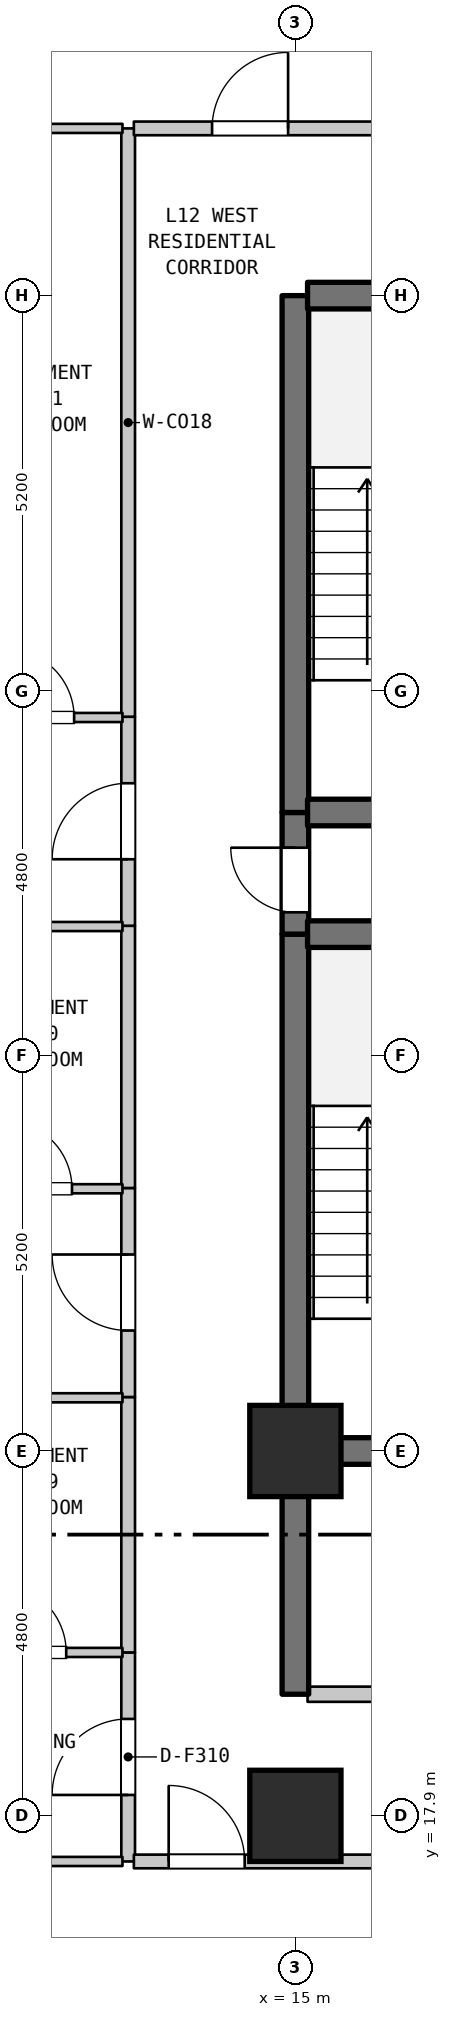
"""IFC4 building model, lengths in metres.
Left out: names, types, materials, properties, quantities, classifications, styles, units other than length and angle.
Written with IfcOpenShell. Run it as: python <this file> out.ifc"""

import sys

from ifc_helpers import new_model, si_unit, direction, frame, frame_2d, origin, origin_2d, place, context, subcontext, project, spatial, rectangle, extrude, element, fill, save


model = new_model("IFC4")
c1 = context("Model", 3, precision=1e-05, world=origin(), true_north=direction((0.0, 1.0)))
c2 = subcontext(c1, "Body", "Model", "MODEL_VIEW")
j1 = project(units=[si_unit("LENGTHUNIT", "METRE"), si_unit("PLANEANGLEUNIT", "RADIAN")], contexts=[c1])
p1 = place(None, origin())
s1 = spatial("IfcSite", under=j1, at=p1, CompositionType="ELEMENT")
p2 = place(p1, origin())
s2 = spatial("IfcBuilding", under=s1, at=p2, CompositionType="ELEMENT")
p3 = place(p2, frame((0.0, 0.0, 53.6)))
s3 = spatial("IfcBuildingStorey", under=s2, at=p3, CompositionType="ELEMENT", Elevation=53.6)
for number, where, z_axis, x_axis in (
    (1, (15.0, 17.9, 0.0), (0.0, 0.0, 1.0), (1.0, 0.0, 0.0)),
    (2, (15.0, 22.7, 0.0), (0.0, 0.0, 1.0), (1.0, 0.0, 0.0)),
):
    element("IfcColumn", number, at=place(p3, frame(where, z_axis=z_axis, x_axis=x_axis)), inside=s3, PredefinedType="COLUMN", context=c2, shape_type="SweptSolid", body=[
        extrude(rectangle(XDim=1.2, YDim=1.2, at=origin_2d()), origin(), (0.0, 0.0, 1.0), 3.7),
    ])
p4 = place(p3, frame((12.8, 17.3, 0.0), z_axis=(0.0, 0.0, 1.0), x_axis=(0.0, 1.0, 0.0)))
e3 = element("IfcWall", 3, at=p4, inside=s3, PredefinedType="STANDARD", context=c2, shape_type="SweptSolid", body=[
    extrude(rectangle(XDim=2.75, YDim=0.18, at=frame_2d((1.375, 0.0))), origin(), (0.0, 0.0, 1.0), 3.385),
])
p5 = place(p4, frame((0.875, 0.0, 0.0)))
e4 = element("IfcOpeningElement", 4, at=p5, cuts=e3, PredefinedType="OPENING", context=c2, shape_type="SweptSolid", body=[
    extrude(rectangle(XDim=1.0, YDim=2.15, at=frame_2d((0.5, 1.075))), frame((0.0, 0.1, 0.0), z_axis=(0.0, -1.0, 0.0), x_axis=(1.0, 0.0, 0.0)), (0.0, 0.0, 1.0), 0.2),
])
p6 = place(p3, frame((12.8, 20.05, 0.0), z_axis=(0.0, 0.0, 1.0), x_axis=(0.0, 1.0, 0.0)))
e5 = element("IfcWall", 5, at=p6, inside=s3, PredefinedType="STANDARD", context=c2, shape_type="SweptSolid", body=[
    extrude(rectangle(XDim=3.36, YDim=0.18, at=frame_2d((1.68, 0.0))), origin(), (0.0, 0.0, 1.0), 3.385),
])
p7 = place(p3, frame((12.8, 23.41, 0.0), z_axis=(0.0, 0.0, 1.0), x_axis=(0.0, 1.0, 0.0)))
e6 = element("IfcWall", 6, at=p7, inside=s3, PredefinedType="STANDARD", context=c2, shape_type="SweptSolid", body=[
    extrude(rectangle(XDim=2.75, YDim=0.18, at=frame_2d((1.375, 0.0))), origin(), (0.0, 0.0, 1.0), 3.385),
])
p8 = place(p7, frame((0.875, 0.0, 0.0)))
e7 = element("IfcOpeningElement", 7, at=p8, cuts=e6, PredefinedType="OPENING", context=c2, shape_type="SweptSolid", body=[
    extrude(rectangle(XDim=1.0, YDim=2.15, at=frame_2d((0.5, 1.075))), frame((0.0, 0.1, 0.0), z_axis=(0.0, -1.0, 0.0), x_axis=(1.0, 0.0, 0.0)), (0.0, 0.0, 1.0), 0.2),
])
p9 = place(p3, frame((12.8, 26.16, 0.0), z_axis=(0.0, 0.0, 1.0), x_axis=(0.0, 1.0, 0.0)))
e8 = element("IfcWall", 8, at=p9, inside=s3, PredefinedType="STANDARD", context=c2, shape_type="SweptSolid", body=[
    extrude(rectangle(XDim=3.45, YDim=0.18, at=frame_2d((1.725, 0.0))), origin(), (0.0, 0.0, 1.0), 3.385),
])
p10 = place(p3, frame((12.8, 29.61, 0.0), z_axis=(0.0, 0.0, 1.0), x_axis=(0.0, 1.0, 0.0)))
e9 = element("IfcWall", 9, at=p10, inside=s3, PredefinedType="STANDARD", context=c2, shape_type="SweptSolid", body=[
    extrude(rectangle(XDim=2.75, YDim=0.18, at=frame_2d((1.375, 0.0))), origin(), (0.0, 0.0, 1.0), 3.385),
])
p11 = place(p10, frame((0.875, 0.0, 0.0)))
e10 = element("IfcOpeningElement", 10, at=p11, cuts=e9, PredefinedType="OPENING", context=c2, shape_type="SweptSolid", body=[
    extrude(rectangle(XDim=1.0, YDim=2.15, at=frame_2d((0.5, 1.075))), frame((0.0, 0.1, 0.0), z_axis=(0.0, -1.0, 0.0), x_axis=(1.0, 0.0, 0.0)), (0.0, 0.0, 1.0), 0.2),
])
p12 = place(p3, frame((12.8, 32.36, 0.0), z_axis=(0.0, 0.0, 1.0), x_axis=(0.0, 1.0, 0.0)))
e11 = element("IfcWall", 11, at=p12, inside=s3, PredefinedType="STANDARD", context=c2, shape_type="SweptSolid", body=[
    extrude(rectangle(XDim=7.74, YDim=0.18, at=frame_2d((3.87, 0.0))), origin(), (0.0, 0.0, 1.0), 3.385),
])
p13 = place(p3, frame((15.0, 19.5, 0.0), z_axis=(0.0, 0.0, 1.0), x_axis=(0.0, 1.0, 0.0)))
e12 = element("IfcWall", 12, at=p13, inside=s3, PredefinedType="SHEAR", context=c2, shape_type="SweptSolid", body=[
    extrude(rectangle(XDim=3.2, YDim=0.35, at=frame_2d((1.6, 0.0))), origin(), (0.0, 0.0, 1.0), 3.385),
])
p14 = place(p3, frame((15.0, 22.7, 0.0), z_axis=(0.0, 0.0, 1.0), x_axis=(0.0, 1.0, 0.0)))
e13 = element("IfcWall", 13, at=p14, inside=s3, PredefinedType="SHEAR", context=c2, shape_type="SweptSolid", body=[
    extrude(rectangle(XDim=6.8, YDim=0.35, at=frame_2d((3.4, 0.0))), origin(), (0.0, 0.0, 1.0), 3.385),
])
p15 = place(p3, frame((15.0, 29.5, 0.0), z_axis=(0.0, 0.0, 1.0), x_axis=(0.0, 1.0, 0.0)))
e14 = element("IfcWall", 14, at=p15, inside=s3, PredefinedType="SHEAR", context=c2, shape_type="SweptSolid", body=[
    extrude(rectangle(XDim=1.6, YDim=0.35, at=frame_2d((0.8, 0.0))), origin(), (0.0, 0.0, 1.0), 3.385),
])
p16 = place(p15, frame((0.287, 0.0, 0.0)))
e15 = element("IfcOpeningElement", 15, at=p16, cuts=e14, PredefinedType="OPENING", context=c2, shape_type="SweptSolid", body=[
    extrude(rectangle(XDim=0.85, YDim=2.1, at=frame_2d((0.425, 1.05))), frame((0.0, 0.185, 0.0), z_axis=(0.0, -1.0, 0.0), x_axis=(1.0, 0.0, 0.0)), (0.0, 0.0, 1.0), 0.37),
])
p17 = place(p3, frame((15.0, 31.1, 0.0), z_axis=(0.0, 0.0, 1.0), x_axis=(0.0, 1.0, 0.0)))
e16 = element("IfcWall", 16, at=p17, inside=s3, PredefinedType="SHEAR", context=c2, shape_type="SweptSolid", body=[
    extrude(rectangle(XDim=6.8, YDim=0.35, at=frame_2d((3.4, 0.0))), origin(), (0.0, 0.0, 1.0), 3.385),
])
p18 = place(p3, frame((9.085, 17.3, 0.0), z_axis=(0.0, 0.0, 1.0), x_axis=(1.0, 0.0, 0.0)))
e17 = element("IfcWall", 17, at=p18, inside=s3, PredefinedType="PARTITIONING", context=c2, shape_type="SweptSolid", body=[
    extrude(rectangle(XDim=3.64, YDim=0.12, at=frame_2d((1.82, 0.0))), origin(), (0.0, 0.0, 1.0), 3.385),
])
p19 = place(p3, frame((12.875, 17.3, 0.0), z_axis=(0.0, 0.0, 1.0), x_axis=(1.0, 0.0, 0.0)))
e18 = element("IfcWall", 18, at=p19, inside=s3, PredefinedType="STANDARD", context=c2, shape_type="SweptSolid", body=[
    extrude(rectangle(XDim=3.78, YDim=0.18, at=frame_2d((1.89, 0.0))), origin(), (0.0, 0.0, 1.0), 3.385),
])
p20 = place(p19, frame((0.458, 0.0, 0.0)))
e19 = element("IfcOpeningElement", 19, at=p20, cuts=e18, PredefinedType="OPENING", context=c2, shape_type="SweptSolid", body=[
    extrude(rectangle(XDim=1.0, YDim=2.15, at=frame_2d((0.5, 1.075))), frame((0.0, 0.1, 0.0), z_axis=(0.0, -1.0, 0.0), x_axis=(1.0, 0.0, 0.0)), (0.0, 0.0, 1.0), 0.2),
])
p21 = place(p3, frame((15.16, 19.5, 0.0), z_axis=(0.0, 0.0, 1.0), x_axis=(1.0, 0.0, 0.0)))
e20 = element("IfcWall", 20, at=p21, inside=s3, PredefinedType="STANDARD", context=c2, shape_type="SweptSolid", body=[
    extrude(rectangle(XDim=3.68, YDim=0.2, at=frame_2d((1.84, 0.0))), origin(), (0.0, 0.0, 1.0), 3.385),
])
p22 = place(p21, frame((1.39, 0.0, 0.0)))
e21 = element("IfcOpeningElement", 21, at=p22, cuts=e20, PredefinedType="OPENING", context=c2, shape_type="SweptSolid", body=[
    extrude(rectangle(XDim=0.9, YDim=2.15, at=frame_2d((0.45, 1.075))), frame((0.0, 0.11, 0.0), z_axis=(0.0, -1.0, 0.0), x_axis=(1.0, 0.0, 0.0)), (0.0, 0.0, 1.0), 0.22),
])
p23 = place(p3, frame((10.456, 20.05, 0.0), z_axis=(0.0, 0.0, 1.0), x_axis=(1.0, 0.0, 0.0)))
e22 = element("IfcWall", 22, at=p23, inside=s3, PredefinedType="PARTITIONING", context=c2, shape_type="SweptSolid", body=[
    extrude(rectangle(XDim=2.269, YDim=0.12, at=frame_2d((1.135, 0.0))), origin(), (0.0, 0.0, 1.0), 3.385),
])
p24 = place(p23, frame((0.629, 0.0, 0.0)))
e23 = element("IfcOpeningElement", 23, at=p24, cuts=e22, PredefinedType="OPENING", context=c2, shape_type="SweptSolid", body=[
    extrude(rectangle(XDim=0.9, YDim=2.1, at=frame_2d((0.45, 1.05))), frame((0.0, 0.07, 0.0), z_axis=(0.0, -1.0, 0.0), x_axis=(1.0, 0.0, 0.0)), (0.0, 0.0, 1.0), 0.14),
])
p25 = place(p3, frame((15.16, 22.7, 0.0), z_axis=(0.0, 0.0, 1.0), x_axis=(1.0, 0.0, 0.0)))
e24 = element("IfcWall", 24, at=p25, inside=s3, PredefinedType="SHEAR", context=c2, shape_type="SweptSolid", body=[
    extrude(rectangle(XDim=3.68, YDim=0.35, at=frame_2d((1.84, 0.0))), origin(), (0.0, 0.0, 1.0), 3.385),
])
p26 = place(p3, frame((10.456, 23.4, 0.0), z_axis=(0.0, 0.0, 1.0), x_axis=(1.0, 0.0, 0.0)))
e25 = element("IfcWall", 25, at=p26, inside=s3, PredefinedType="PARTITIONING", context=c2, shape_type="SweptSolid", body=[
    extrude(rectangle(XDim=2.269, YDim=0.12, at=frame_2d((1.135, 0.0))), origin(), (0.0, 0.0, 1.0), 3.385),
])
p27 = place(p3, frame((10.466, 26.15, 0.0), z_axis=(0.0, 0.0, 1.0), x_axis=(1.0, 0.0, 0.0)))
e26 = element("IfcWall", 26, at=p27, inside=s3, PredefinedType="PARTITIONING", context=c2, shape_type="SweptSolid", body=[
    extrude(rectangle(XDim=2.259, YDim=0.12, at=frame_2d((1.129, 0.0))), origin(), (0.0, 0.0, 1.0), 3.385),
])
p28 = place(p27, frame((0.695, 0.0, 0.0)))
e27 = element("IfcOpeningElement", 27, at=p28, cuts=e26, PredefinedType="OPENING", context=c2, shape_type="SweptSolid", body=[
    extrude(rectangle(XDim=0.9, YDim=2.1, at=frame_2d((0.45, 1.05))), frame((0.0, 0.07, 0.0), z_axis=(0.0, -1.0, 0.0), x_axis=(1.0, 0.0, 0.0)), (0.0, 0.0, 1.0), 0.14),
])
p29 = place(p3, frame((15.16, 29.5, 0.0), z_axis=(0.0, 0.0, 1.0), x_axis=(1.0, 0.0, 0.0)))
e28 = element("IfcWall", 28, at=p29, inside=s3, PredefinedType="SHEAR", context=c2, shape_type="SweptSolid", body=[
    extrude(rectangle(XDim=3.68, YDim=0.35, at=frame_2d((1.84, 0.0))), origin(), (0.0, 0.0, 1.0), 3.385),
])
p30 = place(p3, frame((10.466, 29.6, 0.0), z_axis=(0.0, 0.0, 1.0), x_axis=(1.0, 0.0, 0.0)))
e29 = element("IfcWall", 29, at=p30, inside=s3, PredefinedType="PARTITIONING", context=c2, shape_type="SweptSolid", body=[
    extrude(rectangle(XDim=2.259, YDim=0.12, at=frame_2d((1.129, 0.0))), origin(), (0.0, 0.0, 1.0), 3.385),
])
p31 = place(p3, frame((15.16, 31.1, 0.0), z_axis=(0.0, 0.0, 1.0), x_axis=(1.0, 0.0, 0.0)))
e30 = element("IfcWall", 30, at=p31, inside=s3, PredefinedType="SHEAR", context=c2, shape_type="SweptSolid", body=[
    extrude(rectangle(XDim=3.68, YDim=0.35, at=frame_2d((1.84, 0.0))), origin(), (0.0, 0.0, 1.0), 3.385),
])
p32 = place(p3, frame((10.523, 32.35, 0.0), z_axis=(0.0, 0.0, 1.0), x_axis=(1.0, 0.0, 0.0)))
e31 = element("IfcWall", 31, at=p32, inside=s3, PredefinedType="PARTITIONING", context=c2, shape_type="SweptSolid", body=[
    extrude(rectangle(XDim=2.202, YDim=0.12, at=frame_2d((1.101, 0.0))), origin(), (0.0, 0.0, 1.0), 3.385),
])
p33 = place(p32, frame((0.666, 0.0, 0.0)))
e32 = element("IfcOpeningElement", 32, at=p33, cuts=e31, PredefinedType="OPENING", context=c2, shape_type="SweptSolid", body=[
    extrude(rectangle(XDim=0.9, YDim=2.1, at=frame_2d((0.45, 1.05))), frame((0.0, 0.07, 0.0), z_axis=(0.0, -1.0, 0.0), x_axis=(1.0, 0.0, 0.0)), (0.0, 0.0, 1.0), 0.14),
])
p34 = place(p3, frame((15.16, 37.9, 0.0), z_axis=(0.0, 0.0, 1.0), x_axis=(1.0, 0.0, 0.0)))
e33 = element("IfcWall", 33, at=p34, inside=s3, PredefinedType="SHEAR", context=c2, shape_type="SweptSolid", body=[
    extrude(rectangle(XDim=3.68, YDim=0.35, at=frame_2d((1.84, 0.0))), origin(), (0.0, 0.0, 1.0), 3.385),
])
p35 = place(p3, frame((10.523, 40.1, 0.0), z_axis=(0.0, 0.0, 1.0), x_axis=(1.0, 0.0, 0.0)))
e34 = element("IfcWall", 34, at=p35, inside=s3, PredefinedType="PARTITIONING", context=c2, shape_type="SweptSolid", body=[
    extrude(rectangle(XDim=2.202, YDim=0.12, at=frame_2d((1.101, 0.0))), origin(), (0.0, 0.0, 1.0), 3.385),
])
p36 = place(p3, frame((12.875, 40.1, 0.0), z_axis=(0.0, 0.0, 1.0), x_axis=(1.0, 0.0, 0.0)))
e35 = element("IfcWall", 35, at=p36, inside=s3, PredefinedType="STANDARD", context=c2, shape_type="SweptSolid", body=[
    extrude(rectangle(XDim=3.23, YDim=0.18, at=frame_2d((1.615, 0.0))), origin(), (0.0, 0.0, 1.0), 3.385),
])
p37 = place(p36, frame((1.029, 0.0, 0.0)))
e36 = element("IfcOpeningElement", 36, at=p37, cuts=e35, PredefinedType="OPENING", context=c2, shape_type="SweptSolid", body=[
    extrude(rectangle(XDim=1.0, YDim=2.15, at=frame_2d((0.5, 1.075))), frame((0.0, 0.1, 0.0), z_axis=(0.0, -1.0, 0.0), x_axis=(1.0, 0.0, 0.0)), (0.0, 0.0, 1.0), 0.2),
])
p38 = place(p5, origin())
e37 = element("IfcDoor", 37, at=p38, inside=s3, OperationType="SINGLE_SWING_LEFT", PredefinedType="DOOR", context=c2, shape_type="SweptSolid", body=[
    extrude(rectangle(XDim=1.0, YDim=2.15, at=frame_2d((0.5, 1.075))), frame((0.0, 0.025, 0.0), z_axis=(0.0, -1.0, 0.0), x_axis=(1.0, 0.0, 0.0)), (0.0, 0.0, 1.0), 0.05),
])
fill(e4, e37)
p39 = place(p8, origin())
e38 = element("IfcDoor", 38, at=p39, inside=s3, OperationType="SINGLE_SWING_RIGHT", PredefinedType="DOOR", context=c2, shape_type="SweptSolid", body=[
    extrude(rectangle(XDim=1.0, YDim=2.15, at=frame_2d((0.5, 1.075))), frame((0.0, 0.025, 0.0), z_axis=(0.0, -1.0, 0.0), x_axis=(1.0, 0.0, 0.0)), (0.0, 0.0, 1.0), 0.05),
])
fill(e7, e38)
p40 = place(p11, origin())
e39 = element("IfcDoor", 39, at=p40, inside=s3, OperationType="SINGLE_SWING_LEFT", PredefinedType="DOOR", context=c2, shape_type="SweptSolid", body=[
    extrude(rectangle(XDim=1.0, YDim=2.15, at=frame_2d((0.5, 1.075))), frame((0.0, 0.025, 0.0), z_axis=(0.0, -1.0, 0.0), x_axis=(1.0, 0.0, 0.0)), (0.0, 0.0, 1.0), 0.05),
])
fill(e10, e39)
p41 = place(p16, origin())
e40 = element("IfcDoor", 40, at=p41, inside=s3, OperationType="SINGLE_SWING_RIGHT", PredefinedType="DOOR", context=c2, shape_type="SweptSolid", body=[
    extrude(rectangle(XDim=0.85, YDim=2.1, at=frame_2d((0.425, 1.05))), frame((0.0, 0.025, 0.0), z_axis=(0.0, -1.0, 0.0), x_axis=(1.0, 0.0, 0.0)), (0.0, 0.0, 1.0), 0.05),
])
fill(e15, e40)
p42 = place(p20, origin())
e41 = element("IfcDoor", 41, at=p42, inside=s3, OperationType="SINGLE_SWING_LEFT", PredefinedType="DOOR", context=c2, shape_type="SweptSolid", body=[
    extrude(rectangle(XDim=1.0, YDim=2.15, at=frame_2d((0.5, 1.075))), frame((0.0, 0.025, 0.0), z_axis=(0.0, -1.0, 0.0), x_axis=(1.0, 0.0, 0.0)), (0.0, 0.0, 1.0), 0.05),
])
fill(e19, e41)
p43 = place(p24, origin())
e42 = element("IfcDoor", 42, at=p43, inside=s3, OperationType="SINGLE_SWING_LEFT", PredefinedType="DOOR", context=c2, shape_type="SweptSolid", body=[
    extrude(rectangle(XDim=0.9, YDim=2.1, at=frame_2d((0.45, 1.05))), frame((0.0, 0.025, 0.0), z_axis=(0.0, -1.0, 0.0), x_axis=(1.0, 0.0, 0.0)), (0.0, 0.0, 1.0), 0.05),
])
fill(e23, e42)
p44 = place(p28, origin())
e43 = element("IfcDoor", 43, at=p44, inside=s3, OperationType="SINGLE_SWING_LEFT", PredefinedType="DOOR", context=c2, shape_type="SweptSolid", body=[
    extrude(rectangle(XDim=0.9, YDim=2.1, at=frame_2d((0.45, 1.05))), frame((0.0, 0.025, 0.0), z_axis=(0.0, -1.0, 0.0), x_axis=(1.0, 0.0, 0.0)), (0.0, 0.0, 1.0), 0.05),
])
fill(e27, e43)
p45 = place(p33, origin())
e44 = element("IfcDoor", 44, at=p45, inside=s3, OperationType="SINGLE_SWING_LEFT", PredefinedType="DOOR", context=c2, shape_type="SweptSolid", body=[
    extrude(rectangle(XDim=0.9, YDim=2.1, at=frame_2d((0.45, 1.05))), frame((0.0, 0.025, 0.0), z_axis=(0.0, -1.0, 0.0), x_axis=(1.0, 0.0, 0.0)), (0.0, 0.0, 1.0), 0.05),
])
fill(e32, e44)
p46 = place(p37, origin())
e45 = element("IfcDoor", 45, at=p46, inside=s3, OperationType="SINGLE_SWING_RIGHT", PredefinedType="DOOR", context=c2, shape_type="SweptSolid", body=[
    extrude(rectangle(XDim=1.0, YDim=2.15, at=frame_2d((0.5, 1.075))), frame((0.0, 0.025, 0.0), z_axis=(0.0, -1.0, 0.0), x_axis=(1.0, 0.0, 0.0)), (0.0, 0.0, 1.0), 0.05),
])
fill(e36, e45)
save(model, sys.argv[1])
